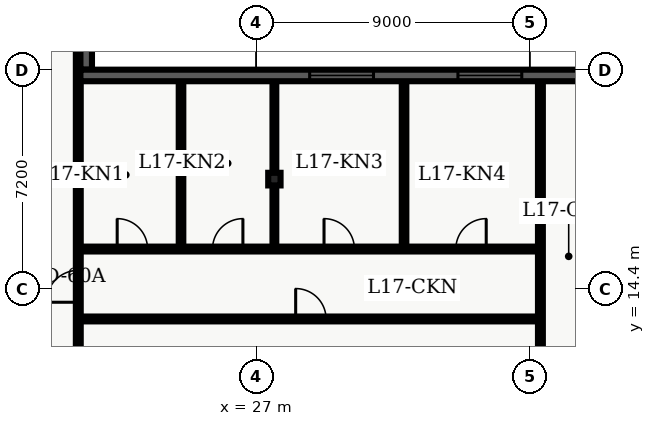
"""IFC4 building model, lengths in metres.
Left out: names, types, materials, properties, quantities, classifications, styles, units other than length and angle.
Written with IfcOpenShell. Run it as: python <this file> out.ifc"""

import sys

from ifc_helpers import new_model, entity, si_unit, converted_unit, direction, frame, origin_with_axes, origin_2d_with_axis, place, context, subcontext, project, spatial, polyline, rectangle, i_section, outline, extrude, element, fill, save


model = new_model("IFC4")
c1 = context("Model", 3, precision=1e-05, world=origin_with_axes(), true_north=direction((0.0, 1.0)))
c2 = subcontext(c1, "Body", "Model", "MODEL_VIEW")
j1 = project(units=[si_unit("LENGTHUNIT", "METRE"), converted_unit("PLANEANGLEUNIT", "DEGREE", entity("IfcPlaneAngleMeasure", 0.017), si_unit("PLANEANGLEUNIT", "RADIAN"), dimensions=[0, 0, 0, 0, 0, 0, 0])], contexts=[c1])
p1 = place(None, origin_with_axes())
s1 = spatial("IfcSite", under=j1, at=p1, CompositionType="ELEMENT")
p2 = place(p1, origin_with_axes())
s2 = spatial("IfcBuilding", under=s1, at=p2, CompositionType="ELEMENT")
p3 = place(p2, frame((0.0, 0.0, 71.7), z_axis=(0.0, 0.0, 1.0), x_axis=(1.0, 0.0, 0.0)))
s3 = spatial("IfcBuildingStorey", under=s2, at=p3, CompositionType="ELEMENT", Elevation=71.7)
p4 = place(p3, frame((27.6, 18.0, 0.0), z_axis=(0.0, 0.0, 1.0), x_axis=(1.0, 0.0, 0.0)))
e1 = element("IfcColumn", 1, at=p4, inside=s3, PredefinedType="COLUMN", context=c2, shape_type="SweptSolid", body=[
    extrude(i_section(OverallWidth=0.406, OverallDepth=0.416, WebThickness=0.03, FlangeThickness=0.048, FilletRadius=0.022, at=origin_2d_with_axis()), origin_with_axes(), (0.0, 0.0, 1.0), 3.9),
])
p5 = place(p3, frame((21.15, 7.8, 0.0), z_axis=(0.0, 0.0, 1.0), x_axis=(0.0, 1.0, 0.0)))
e2 = element("IfcWall", 2, at=p5, inside=s3, PredefinedType="PARTITIONING", context=c2, shape_type="SweptSolid", body=[
    extrude(outline(polyline([(0.0, -0.08), (32.7, -0.08), (32.7, 0.08), (0.0, 0.08), (0.0, -0.08)])), origin_with_axes(), (0.0, 0.0, 1.0), 2.7),
])
p6 = place(p5, frame((6.675, 0.0, 0.0), z_axis=(0.0, 0.0, 1.0), x_axis=(1.0, 0.0, 0.0)))
e3 = element("IfcOpeningElement", 3, at=p6, cuts=e2, PredefinedType="OPENING", context=c2, shape_type="SweptSolid", body=[
    extrude(rectangle(XDim=1.05, YDim=0.18, at=origin_2d_with_axis()), origin_with_axes(), (0.0, 0.0, 1.0), 2.15),
])
p7 = place(p3, frame((21.15, 13.4, 0.0), z_axis=(0.0, 0.0, 1.0), x_axis=(1.0, 0.0, 0.0)))
e4 = element("IfcWall", 4, at=p7, inside=s3, PredefinedType="PARTITIONING", context=c2, shape_type="SweptSolid", body=[
    extrude(outline(polyline([(0.0, -0.08), (15.2, -0.08), (15.2, 0.08), (0.0, 0.08), (0.0, -0.08)])), origin_with_axes(), (0.0, 0.0, 1.0), 2.7),
])
p8 = place(p7, frame((7.65, 0.0, 0.0), z_axis=(0.0, 0.0, 1.0), x_axis=(1.0, 0.0, 0.0)))
e5 = element("IfcOpeningElement", 5, at=p8, cuts=e4, PredefinedType="OPENING", context=c2, shape_type="SweptSolid", body=[
    extrude(rectangle(XDim=1.0, YDim=0.18, at=origin_2d_with_axis()), origin_with_axes(), (0.0, 0.0, 1.0), 2.15),
])
p9 = place(p3, frame((21.15, 15.7, 0.0), z_axis=(0.0, 0.0, 1.0), x_axis=(1.0, 0.0, 0.0)))
e6 = element("IfcWall", 6, at=p9, inside=s3, PredefinedType="PARTITIONING", context=c2, shape_type="SweptSolid", body=[
    extrude(outline(polyline([(0.0, -0.08), (15.2, -0.08), (15.2, 0.08), (0.0, 0.08), (0.0, -0.08)])), origin_with_axes(), (0.0, 0.0, 1.0), 2.7),
])
p10 = place(p9, frame((1.78, 0.0, 0.0), z_axis=(0.0, 0.0, 1.0), x_axis=(1.0, 0.0, 0.0)))
e7 = element("IfcOpeningElement", 7, at=p10, cuts=e6, PredefinedType="OPENING", context=c2, shape_type="SweptSolid", body=[
    extrude(rectangle(XDim=1.0, YDim=0.18, at=origin_2d_with_axis()), origin_with_axes(), (0.0, 0.0, 1.0), 2.15),
])
p11 = place(p9, frame((4.915, 0.0, 0.0), z_axis=(0.0, 0.0, 1.0), x_axis=(1.0, 0.0, 0.0)))
e8 = element("IfcOpeningElement", 8, at=p11, cuts=e6, PredefinedType="OPENING", context=c2, shape_type="SweptSolid", body=[
    extrude(rectangle(XDim=1.0, YDim=0.18, at=origin_2d_with_axis()), origin_with_axes(), (0.0, 0.0, 1.0), 2.15),
])
p12 = place(p9, frame((8.582, 0.0, 0.0), z_axis=(0.0, 0.0, 1.0), x_axis=(1.0, 0.0, 0.0)))
e9 = element("IfcOpeningElement", 9, at=p12, cuts=e6, PredefinedType="OPENING", context=c2, shape_type="SweptSolid", body=[
    extrude(rectangle(XDim=1.0, YDim=0.18, at=origin_2d_with_axis()), origin_with_axes(), (0.0, 0.0, 1.0), 2.15),
])
p13 = place(p9, frame((12.918, 0.0, 0.0), z_axis=(0.0, 0.0, 1.0), x_axis=(1.0, 0.0, 0.0)))
e10 = element("IfcOpeningElement", 10, at=p13, cuts=e6, PredefinedType="OPENING", context=c2, shape_type="SweptSolid", body=[
    extrude(rectangle(XDim=1.0, YDim=0.18, at=origin_2d_with_axis()), origin_with_axes(), (0.0, 0.0, 1.0), 2.15),
])
p14 = place(p3, frame((36.35, 4.35, 0.0), z_axis=(0.0, 0.0, 1.0), x_axis=(0.0, 1.0, 0.0)))
e11 = element("IfcWall", 11, at=p14, inside=s3, PredefinedType="PARTITIONING", context=c2, shape_type="SweptSolid", body=[
    extrude(outline(polyline([(0.0, -0.08), (16.95, -0.08), (16.95, 0.08), (0.0, 0.08), (0.0, -0.08)])), origin_with_axes(), (0.0, 0.0, 1.0), 2.7),
])
p15 = place(p3, frame((24.529, 15.82, 0.0), z_axis=(0.0, 0.0, 1.0), x_axis=(0.0, 1.0, 0.0)))
e12 = element("IfcWall", 12, at=p15, inside=s3, PredefinedType="PARTITIONING", context=c2, shape_type="SweptSolid", body=[
    extrude(outline(polyline([(0.0, -0.075), (5.405, -0.075), (5.405, 0.075), (0.0, 0.075), (0.0, -0.075)])), origin_with_axes(), (0.0, 0.0, 1.0), 2.7),
])
p16 = place(p3, frame((27.6, 15.82, 0.0), z_axis=(0.0, 0.0, 1.0), x_axis=(0.0, 1.0, 0.0)))
e13 = element("IfcWall", 13, at=p16, inside=s3, PredefinedType="PARTITIONING", context=c2, shape_type="SweptSolid", body=[
    extrude(outline(polyline([(0.0, -0.062), (5.405, -0.062), (5.405, 0.062), (0.0, 0.062), (0.0, -0.062)])), origin_with_axes(), (0.0, 0.0, 1.0), 2.7),
])
p17 = place(p3, frame((31.865, 15.82, 0.0), z_axis=(0.0, 0.0, 1.0), x_axis=(0.0, 1.0, 0.0)))
e14 = element("IfcWall", 14, at=p17, inside=s3, PredefinedType="PARTITIONING", context=c2, shape_type="SweptSolid", body=[
    extrude(outline(polyline([(0.0, -0.075), (5.405, -0.075), (5.405, 0.075), (0.0, 0.075), (0.0, -0.075)])), origin_with_axes(), (0.0, 0.0, 1.0), 2.7),
])
p18 = place(p3, frame((21.41, 45.82, 0.0), z_axis=(0.0, 0.0, 1.0), x_axis=(0.0, -1.0, 0.0)))
e15 = element("IfcWall", 15, at=p18, inside=s3, PredefinedType="SOLIDWALL", context=c2, shape_type="SweptSolid", body=[
    extrude(outline(polyline([(0.0, -0.19), (24.22, -0.19), (24.22, 0.19), (0.0, 0.19), (0.0, -0.19)])), origin_with_axes(), (0.0, 0.0, 1.0), 3.66),
])
p19 = place(p18, frame((2.902, 0.0, 0.45), z_axis=(0.0, 0.0, 1.0), x_axis=(1.0, 0.0, 0.0)))
e16 = element("IfcOpeningElement", 16, at=p19, cuts=e15, PredefinedType="OPENING", context=c2, shape_type="SweptSolid", body=[
    extrude(rectangle(XDim=2.1, YDim=0.4, at=origin_2d_with_axis()), origin_with_axes(), (0.0, 0.0, 1.0), 2.2),
])
p20 = place(p3, frame((21.22, 21.41, 0.0), z_axis=(0.0, 0.0, 1.0), x_axis=(1.0, 0.0, 0.0)))
e17 = element("IfcWall", 17, at=p20, inside=s3, PredefinedType="SOLIDWALL", context=c2, shape_type="SweptSolid", body=[
    extrude(outline(polyline([(0.0, -0.19), (17.18, -0.19), (17.18, 0.19), (0.0, 0.19), (0.0, -0.19)])), origin_with_axes(), (0.0, 0.0, 1.0), 3.66),
])
p21 = place(p20, frame((8.59, 0.0, 0.45), z_axis=(0.0, 0.0, 1.0), x_axis=(1.0, 0.0, 0.0)))
e18 = element("IfcOpeningElement", 18, at=p21, cuts=e17, PredefinedType="OPENING", context=c2, shape_type="SweptSolid", body=[
    extrude(rectangle(XDim=2.1, YDim=0.4, at=origin_2d_with_axis()), origin_with_axes(), (0.0, 0.0, 1.0), 2.2),
])
p22 = place(p20, frame((13.467, 0.0, 0.45), z_axis=(0.0, 0.0, 1.0), x_axis=(1.0, 0.0, 0.0)))
e19 = element("IfcOpeningElement", 19, at=p22, cuts=e17, PredefinedType="OPENING", context=c2, shape_type="SweptSolid", body=[
    extrude(rectangle(XDim=2.1, YDim=0.4, at=origin_2d_with_axis()), origin_with_axes(), (0.0, 0.0, 1.0), 2.2),
])
p23 = place(p5, frame((6.675, 0.0, 0.0), z_axis=(0.0, 0.0, 1.0), x_axis=(1.0, 0.0, 0.0)))
e20 = element("IfcDoor", 20, at=p23, inside=s3, OperationType="SINGLE_SWING_LEFT", PredefinedType="DOOR", context=c2, shape_type="SweptSolid", body=[
    extrude(rectangle(XDim=1.05, YDim=0.09, at=origin_2d_with_axis()), origin_with_axes(), (0.0, 0.0, 1.0), 2.15),
])
fill(e3, e20)
p24 = place(p7, frame((7.65, 0.0, 0.0), z_axis=(0.0, 0.0, 1.0), x_axis=(1.0, 0.0, 0.0)))
e21 = element("IfcDoor", 21, at=p24, inside=s3, OperationType="SINGLE_SWING_LEFT", PredefinedType="DOOR", context=c2, shape_type="SweptSolid", body=[
    extrude(rectangle(XDim=1.0, YDim=0.09, at=origin_2d_with_axis()), origin_with_axes(), (0.0, 0.0, 1.0), 2.15),
])
fill(e5, e21)
p25 = place(p9, frame((1.78, 0.0, 0.0), z_axis=(0.0, 0.0, 1.0), x_axis=(1.0, 0.0, 0.0)))
e22 = element("IfcDoor", 22, at=p25, inside=s3, OperationType="SINGLE_SWING_LEFT", PredefinedType="DOOR", context=c2, shape_type="SweptSolid", body=[
    extrude(rectangle(XDim=1.0, YDim=0.09, at=origin_2d_with_axis()), origin_with_axes(), (0.0, 0.0, 1.0), 2.15),
])
fill(e7, e22)
p26 = place(p9, frame((4.915, 0.0, 0.0), z_axis=(0.0, 0.0, 1.0), x_axis=(1.0, 0.0, 0.0)))
e23 = element("IfcDoor", 23, at=p26, inside=s3, OperationType="SINGLE_SWING_RIGHT", PredefinedType="DOOR", context=c2, shape_type="SweptSolid", body=[
    extrude(rectangle(XDim=1.0, YDim=0.09, at=origin_2d_with_axis()), origin_with_axes(), (0.0, 0.0, 1.0), 2.15),
])
fill(e8, e23)
p27 = place(p9, frame((8.582, 0.0, 0.0), z_axis=(0.0, 0.0, 1.0), x_axis=(1.0, 0.0, 0.0)))
e24 = element("IfcDoor", 24, at=p27, inside=s3, OperationType="SINGLE_SWING_LEFT", PredefinedType="DOOR", context=c2, shape_type="SweptSolid", body=[
    extrude(rectangle(XDim=1.0, YDim=0.09, at=origin_2d_with_axis()), origin_with_axes(), (0.0, 0.0, 1.0), 2.15),
])
fill(e9, e24)
p28 = place(p9, frame((12.918, 0.0, 0.0), z_axis=(0.0, 0.0, 1.0), x_axis=(1.0, 0.0, 0.0)))
e25 = element("IfcDoor", 25, at=p28, inside=s3, OperationType="SINGLE_SWING_RIGHT", PredefinedType="DOOR", context=c2, shape_type="SweptSolid", body=[
    extrude(rectangle(XDim=1.0, YDim=0.09, at=origin_2d_with_axis()), origin_with_axes(), (0.0, 0.0, 1.0), 2.15),
])
fill(e10, e25)
p29 = place(p20, frame((8.59, 0.0, 0.45), z_axis=(0.0, 0.0, 1.0), x_axis=(1.0, 0.0, 0.0)))
e26 = element("IfcWindow", 26, at=p29, inside=s3, PredefinedType="WINDOW", context=c2, shape_type="SweptSolid", body=[
    extrude(rectangle(XDim=2.1, YDim=0.09, at=origin_2d_with_axis()), origin_with_axes(), (0.0, 0.0, 1.0), 2.2),
])
fill(e18, e26)
p30 = place(p20, frame((13.467, 0.0, 0.45), z_axis=(0.0, 0.0, 1.0), x_axis=(1.0, 0.0, 0.0)))
e27 = element("IfcWindow", 27, at=p30, inside=s3, PredefinedType="WINDOW", context=c2, shape_type="SweptSolid", body=[
    extrude(rectangle(XDim=2.1, YDim=0.09, at=origin_2d_with_axis()), origin_with_axes(), (0.0, 0.0, 1.0), 2.2),
])
fill(e19, e27)
save(model, sys.argv[1])
